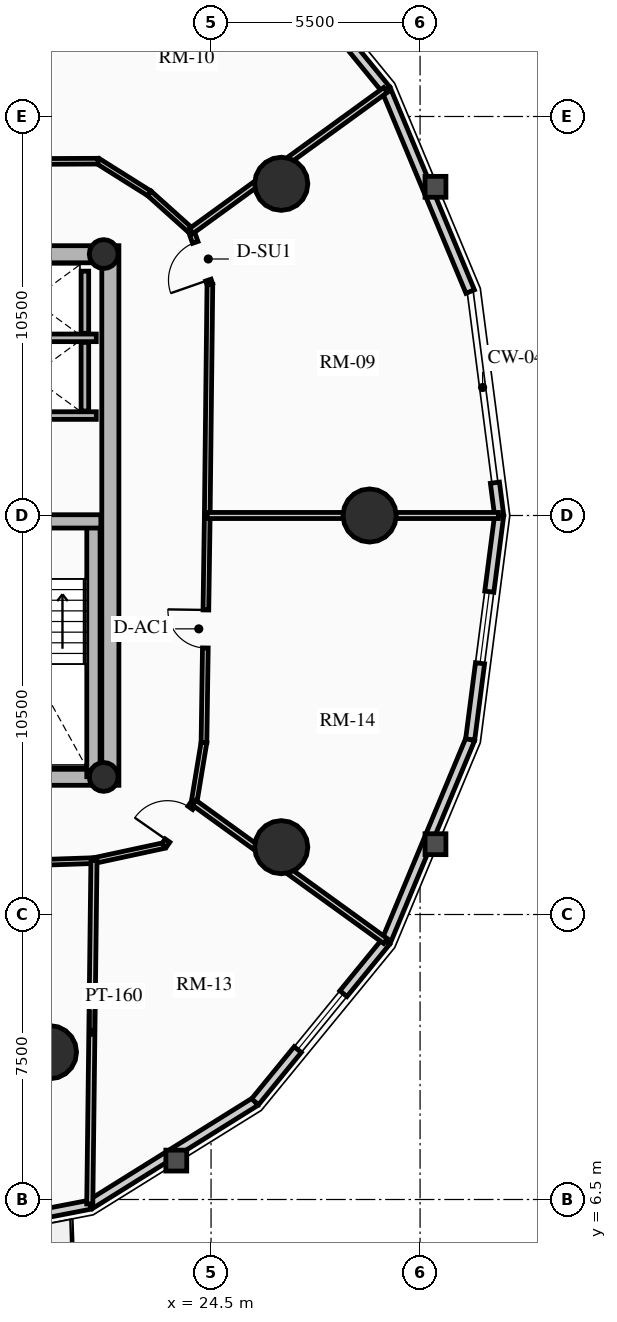
"""IFC4 building model, lengths in metres.
Left out: names, types, materials, properties, quantities, classifications, styles, units other than length and angle.
Written with IfcOpenShell. Run it as: python <this file> out.ifc"""

import sys

from ifc_helpers import new_model, si_unit, direction, frame, frame_2d, origin, origin_2d, place, context, subcontext, project, spatial, rectangle, circle, hollow_circle, extrude, source, transform, mapped, element, fill, save


model = new_model("IFC4")
c1 = context("Model", 3, precision=1e-05, world=origin(), true_north=direction((0.0, 1.0)))
c2 = subcontext(c1, "Body", "Model", "MODEL_VIEW")
j1 = project(units=[si_unit("LENGTHUNIT", "METRE"), si_unit("PLANEANGLEUNIT", "RADIAN")], contexts=[c1])
p1 = place(None, origin())
s1 = spatial("IfcSite", under=j1, at=p1, CompositionType="ELEMENT")
p2 = place(p1, origin())
s2 = spatial("IfcBuilding", under=s1, at=p2, CompositionType="ELEMENT")
p3 = place(p2, frame((0.0, 0.0, 122.53)))
s3 = spatial("IfcBuildingStorey", under=s2, at=p3, CompositionType="ELEMENT", Elevation=122.53)
p4 = place(p3, frame((21.85, 17.4, 0.0), z_axis=(0.0, 0.0, 1.0), x_axis=(0.0, 1.0, 0.0)))
e1 = element("IfcWall", 1, at=p4, inside=s3, PredefinedType="SHEAR", context=c2, shape_type="SweptSolid", body=[
    extrude(rectangle(XDim=14.2, YDim=0.45, at=frame_2d((7.1, 0.0))), origin(), (0.0, 0.0, 1.0), 2.91),
])
p5 = place(p3, frame((11.15, 17.625, 0.0), z_axis=(0.0, 0.0, 1.0), x_axis=(1.0, 0.0, 0.0)))
e2 = element("IfcWall", 2, at=p5, inside=s3, PredefinedType="SHEAR", context=c2, shape_type="SweptSolid", body=[
    extrude(rectangle(XDim=10.7, YDim=0.45, at=frame_2d((5.35, 0.0))), origin(), (0.0, 0.0, 1.0), 2.91),
])
m1 = source(origin(), c2, "Body", "SweptSolid", [
    extrude(rectangle(XDim=1.5, YDim=2.02, at=frame_2d((0.75, 1.01))), frame((0.0, 0.235, 0.0), z_axis=(0.0, -1.0, 0.0), x_axis=(1.0, 0.0, 0.0)), (0.0, 0.0, 1.0), 0.47),
])
p6 = place(p5, frame((5.45, 0.0, 0.0)))
e3 = element("IfcOpeningElement", 3, at=p6, cuts=e2, PredefinedType="OPENING", context=c2, shape_type="MappedRepresentation", body=[
    mapped(m1, transform((0.0, 0.0, 0.0), x_axis=(1.0, 0.0, 0.0), y_axis=(0.0, 1.0, 0.0), z_axis=(0.0, 0.0, 1.0), scale=1.0)),
])
p7 = place(p3, frame((11.15, 31.375, 0.0), z_axis=(0.0, 0.0, 1.0), x_axis=(1.0, 0.0, 0.0)))
e4 = element("IfcWall", 4, at=p7, inside=s3, PredefinedType="SHEAR", context=c2, shape_type="SweptSolid", body=[
    extrude(rectangle(XDim=10.7, YDim=0.45, at=frame_2d((5.35, 0.0))), origin(), (0.0, 0.0, 1.0), 2.91),
])
p8 = place(p7, frame((4.6, 0.0, 0.0)))
e5 = element("IfcOpeningElement", 5, at=p8, cuts=e4, PredefinedType="OPENING", context=c2, shape_type="MappedRepresentation", body=[
    mapped(m1, transform((0.0, 0.0, 0.0), x_axis=(1.0, 0.0, 0.0), y_axis=(0.0, 1.0, 0.0), z_axis=(0.0, 0.0, 1.0), scale=1.0)),
])
p9 = place(p3, frame((21.405, 17.625, 0.0), z_axis=(0.0, 0.0, 1.0), x_axis=(0.0, 1.0, 0.0)))
e6 = element("IfcWall", 6, at=p9, inside=s3, PredefinedType="SHEAR", context=c2, shape_type="SweptSolid", body=[
    extrude(rectangle(XDim=6.72, YDim=0.35, at=frame_2d((3.36, 0.0))), origin(), (0.0, 0.0, 1.0), 2.91),
])
p10 = place(p3, frame((18.315, 24.345, 0.0), z_axis=(0.0, 0.0, 1.0), x_axis=(1.0, 0.0, 0.0)))
e7 = element("IfcWall", 7, at=p10, inside=s3, PredefinedType="SHEAR", context=c2, shape_type="SweptSolid", body=[
    extrude(rectangle(XDim=3.285, YDim=0.35, at=frame_2d((1.643, 0.0))), origin(), (0.0, 0.0, 1.0), 2.91),
])
for number, where, z_axis, x_axis in (
    (8, (21.675, 17.62, 0.0), (0.0, 0.0, 1.0), (1.0, 0.0, 0.0)),
    (9, (21.675, 31.38, 0.0), (0.0, 0.0, 1.0), (1.0, 0.0, 0.0)),
):
    element("IfcColumn", number, at=place(p3, frame(where, z_axis=z_axis, x_axis=x_axis)), inside=s3, PredefinedType="COLUMN", context=c2, shape_type="SweptSolid", body=[
        extrude(hollow_circle(Radius=0.38, WallThickness=0.032, at=origin_2d()), origin(), (0.0, 0.0, 1.0), 2.91),
    ])
for number, where, z_axis, x_axis in (
    (10, (28.672, 24.5, 0.0), (0.0, 0.0, 1.0), (1.0, 0.0, 0.0)),
    (11, (26.347, 33.229, 0.0), (0.0, 0.0, 1.0), (1.0, 0.0, 0.0)),
    (12, (20.261, 10.377, 0.0), (0.0, 0.0, 1.0), (1.0, 0.0, 0.0)),
    (13, (26.347, 15.771, 0.0), (0.0, 0.0, 1.0), (1.0, 0.0, 0.0)),
):
    element("IfcColumn", number, at=place(p3, frame(where, z_axis=z_axis, x_axis=x_axis)), inside=s3, PredefinedType="USERDEFINED", context=c2, shape_type="SweptSolid", body=[
        extrude(circle(Radius=0.7, at=origin_2d()), origin(), (0.0, 0.0, 1.0), 2.91),
    ])
p11 = place(p3, frame((31.969, 25.363, 0.0), z_axis=(0.0, 0.0, 1.0), x_axis=(0.128523364007, -0.991706481225, 0.0)))
e14 = element("IfcWall", 14, at=p11, inside=s3, PredefinedType="SOLIDWALL", context=c2, shape_type="SweptSolid", body=[
    extrude(rectangle(XDim=0.87, YDim=0.24, at=frame_2d((0.435, 0.0))), origin(), (0.0, 0.0, 1.0), 2.615),
])
p12 = place(p3, frame((29.105, 35.709, 0.0), z_axis=(0.0, 0.0, 1.0), x_axis=(0.384344417632, -0.923189779317, 0.0)))
e15 = element("IfcWall", 15, at=p12, inside=s3, PredefinedType="SOLIDWALL", context=c2, shape_type="SweptSolid", body=[
    extrude(rectangle(XDim=5.758, YDim=0.24, at=frame_2d((2.879, 0.0))), origin(), (0.0, 0.0, 1.0), 2.139),
])
p13 = place(p3, frame((25.658, 39.928, 0.0), z_axis=(0.0, 0.0, 1.0), x_axis=(0.632700781152, -0.77439635945, 0.0)))
e16 = element("IfcWall", 16, at=p13, inside=s3, PredefinedType="SOLIDWALL", context=c2, shape_type="SweptSolid", body=[
    extrude(rectangle(XDim=5.448, YDim=0.24, at=frame_2d((2.724, 0.0))), origin(), (0.0, 0.0, 1.0), 2.139),
])
m2 = source(origin(), c2, "Body", "SweptSolid", [
    extrude(rectangle(XDim=1.9, YDim=1.35, at=frame_2d((0.95, 0.675))), frame((0.0, 0.13, 0.0), z_axis=(0.0, -1.0, 0.0), x_axis=(1.0, 0.0, 0.0)), (0.0, 0.0, 1.0), 0.26),
])
p14 = place(p13, frame((1.774, 0.0, 0.65)))
e17 = element("IfcOpeningElement", 17, at=p14, cuts=e16, PredefinedType="OPENING", context=c2, shape_type="MappedRepresentation", body=[
    mapped(m2, transform((0.0, 0.0, 0.0), x_axis=(1.0, 0.0, 0.0), y_axis=(0.0, 1.0, 0.0), z_axis=(0.0, 0.0, 1.0), scale=1.0)),
])
p15 = place(p3, frame((21.315, 6.363, 0.0), z_axis=(0.0, 0.0, 1.0), x_axis=(-0.981723785992, -0.190311344954, 0.0)))
e18 = element("IfcWall", 18, at=p15, inside=s3, PredefinedType="SOLIDWALL", context=c2, shape_type="SweptSolid", body=[
    extrude(rectangle(XDim=4.904, YDim=0.24, at=frame_2d((2.452, 0.0))), origin(), (0.0, 0.0, 1.0), 2.139),
])
m3 = source(origin(), c2, "Body", "SweptSolid", [
    extrude(rectangle(XDim=1.15, YDim=2.005, at=frame_2d((0.575, 1.002))), frame((0.0, 0.13, 0.0), z_axis=(0.0, -1.0, 0.0), x_axis=(1.0, 0.0, 0.0)), (0.0, 0.0, 1.0), 0.26),
])
p16 = place(p15, frame((1.877, 0.0, 0.0)))
e19 = element("IfcOpeningElement", 19, at=p16, cuts=e18, PredefinedType="OPENING", context=c2, shape_type="MappedRepresentation", body=[
    mapped(m3, transform((0.0, 0.0, 0.0), x_axis=(1.0, 0.0, 0.0), y_axis=(0.0, 1.0, 0.0), z_axis=(0.0, 0.0, 1.0), scale=1.0)),
])
p17 = place(p3, frame((25.658, 9.072, 0.0), z_axis=(0.0, 0.0, 1.0), x_axis=(-0.848520380187, -0.529162701263, 0.0)))
e20 = element("IfcWall", 20, at=p17, inside=s3, PredefinedType="SOLIDWALL", context=c2, shape_type="SweptSolid", body=[
    extrude(rectangle(XDim=5.119, YDim=0.24, at=frame_2d((2.56, 0.0))), origin(), (0.0, 0.0, 1.0), 2.139),
])
p18 = place(p3, frame((29.105, 13.291, 0.0), z_axis=(0.0, 0.0, 1.0), x_axis=(-0.632700781152, -0.77439635945, 0.0)))
e21 = element("IfcWall", 21, at=p18, inside=s3, PredefinedType="SOLIDWALL", context=c2, shape_type="SweptSolid", body=[
    extrude(rectangle(XDim=5.448, YDim=0.24, at=frame_2d((2.724, 0.0))), origin(), (0.0, 0.0, 1.0), 2.139),
])
p19 = place(p18, frame((1.774, 0.0, 0.65)))
e22 = element("IfcOpeningElement", 22, at=p19, cuts=e21, PredefinedType="OPENING", context=c2, shape_type="MappedRepresentation", body=[
    mapped(m2, transform((0.0, 0.0, 0.0), x_axis=(1.0, 0.0, 0.0), y_axis=(0.0, 1.0, 0.0), z_axis=(0.0, 0.0, 1.0), scale=1.0)),
])
p20 = place(p3, frame((31.318, 18.607, 0.0), z_axis=(0.0, 0.0, 1.0), x_axis=(-0.384344417632, -0.923189779317, 0.0)))
e23 = element("IfcWall", 23, at=p20, inside=s3, PredefinedType="SOLIDWALL", context=c2, shape_type="SweptSolid", body=[
    extrude(rectangle(XDim=5.758, YDim=0.24, at=frame_2d((2.879, 0.0))), origin(), (0.0, 0.0, 1.0), 2.139),
])
p21 = place(p3, frame((32.081, 24.5, 0.0), z_axis=(0.0, 0.0, 1.0), x_axis=(-0.128351991996, -0.991728675672, 0.0)))
e24 = element("IfcWall", 24, at=p21, inside=s3, PredefinedType="SOLIDWALL", context=c2, shape_type="SweptSolid", body=[
    extrude(rectangle(XDim=5.942, YDim=0.24, at=frame_2d((2.971, 0.0))), origin(), (0.0, 0.0, 1.0), 2.139),
])
p22 = place(p21, frame((2.021, 0.0, 0.65)))
e25 = element("IfcOpeningElement", 25, at=p22, cuts=e24, PredefinedType="OPENING", context=c2, shape_type="MappedRepresentation", body=[
    mapped(m2, transform((0.0, 0.0, 0.0), x_axis=(1.0, 0.0, 0.0), y_axis=(0.0, 1.0, 0.0), z_axis=(0.0, 0.0, 1.0), scale=1.0)),
])
for number, where, z_axis, x_axis in (
    (26, (18.51, 27.13, 0.0), (0.0, 0.0, 1.0), (1.0, 0.0, 0.0)),
    (27, (18.51, 29.175, 0.0), (0.0, 0.0, 1.0), (1.0, 0.0, 0.0)),
):
    element("IfcWall", number, at=place(p3, frame(where, z_axis=z_axis, x_axis=x_axis)), inside=s3, PredefinedType="SHEAR", context=c2, shape_type="SweptSolid", body=[
        extrude(rectangle(XDim=2.97, YDim=0.2, at=frame_2d((1.485, 0.0))), origin(), (0.0, 0.0, 1.0), 2.91),
    ])
p23 = place(p3, frame((21.18, 27.25, 0.0), z_axis=(0.0, 0.0, 1.0), x_axis=(0.0, 1.0, 0.0)))
e28 = element("IfcWall", 28, at=p23, inside=s3, PredefinedType="SHEAR", context=c2, shape_type="SweptSolid", body=[
    extrude(rectangle(XDim=1.805, YDim=0.2, at=frame_2d((0.902, 0.0))), origin(), (0.0, 0.0, 1.0), 2.91),
])
p24 = place(p3, frame((21.18, 29.295, 0.0), z_axis=(0.0, 0.0, 1.0), x_axis=(0.0, 1.0, 0.0)))
e29 = element("IfcWall", 29, at=p24, inside=s3, PredefinedType="SHEAR", context=c2, shape_type="SweptSolid", body=[
    extrude(rectangle(XDim=1.635, YDim=0.2, at=frame_2d((0.817, 0.0))), origin(), (0.0, 0.0, 1.0), 2.91),
])
p25 = place(p3, frame((24.4, 24.5, 0.0), z_axis=(0.0, 0.0, 1.0), x_axis=(0.011359710161, 0.999935476411, 0.0)))
e30 = element("IfcWall", 30, at=p25, inside=s3, PredefinedType="PARTITIONING", context=c2, shape_type="SweptSolid", body=[
    extrude(rectangle(XDim=6.082, YDim=0.15, at=frame_2d((3.041, 0.0))), origin(), (0.0, 0.0, 1.0), 2.185),
])
p26 = place(p3, frame((24.469, 30.582, 0.0), z_axis=(0.0, 0.0, 1.0), x_axis=(-0.328902536986, 0.944363871166, 0.0)))
e31 = element("IfcWall", 31, at=p26, inside=s3, PredefinedType="PARTITIONING", context=c2, shape_type="SweptSolid", body=[
    extrude(rectangle(XDim=1.488, YDim=0.15, at=frame_2d((0.744, 0.0))), origin(), (0.0, 0.0, 1.0), 2.185),
])
m4 = source(origin(), c2, "Body", "SweptSolid", [
    extrude(rectangle(XDim=1.05, YDim=2.015, at=frame_2d((0.525, 1.007))), frame((0.0, 0.085, 0.0), z_axis=(0.0, -1.0, 0.0), x_axis=(1.0, 0.0, 0.0)), (0.0, 0.0, 1.0), 0.17),
])
p27 = place(p26, frame((0.12, 0.0, 0.0)))
e32 = element("IfcOpeningElement", 32, at=p27, cuts=e31, PredefinedType="OPENING", context=c2, shape_type="MappedRepresentation", body=[
    mapped(m4, transform((0.0, 0.0, 0.0), x_axis=(1.0, 0.0, 0.0), y_axis=(0.0, 1.0, 0.0), z_axis=(0.0, 0.0, 1.0), scale=1.0)),
])
p28 = place(p3, frame((23.98, 31.987, 0.0), z_axis=(0.0, 0.0, 1.0), x_axis=(-0.744317922268, 0.667825449193, 0.0)))
e33 = element("IfcWall", 33, at=p28, inside=s3, PredefinedType="PARTITIONING", context=c2, shape_type="SweptSolid", body=[
    extrude(rectangle(XDim=1.481, YDim=0.15, at=frame_2d((0.74, 0.0))), origin(), (0.0, 0.0, 1.0), 2.185),
])
p29 = place(p3, frame((22.877, 32.976, 0.0), z_axis=(0.0, 0.0, 1.0), x_axis=(-0.846723232687, 0.532033614754, 0.0)))
e34 = element("IfcWall", 34, at=p29, inside=s3, PredefinedType="PARTITIONING", context=c2, shape_type="SweptSolid", body=[
    extrude(rectangle(XDim=1.595, YDim=0.15, at=frame_2d((0.797, 0.0))), origin(), (0.0, 0.0, 1.0), 2.185),
])
p30 = place(p3, frame((21.527, 33.824, 0.0), z_axis=(0.0, 0.0, 1.0), x_axis=(-0.999990631344, -0.00432865146, 0.0)))
e35 = element("IfcWall", 35, at=p30, inside=s3, PredefinedType="PARTITIONING", context=c2, shape_type="SweptSolid", body=[
    extrude(rectangle(XDim=3.384, YDim=0.15, at=frame_2d((1.692, 0.0))), origin(), (0.0, 0.0, 1.0), 2.185),
])
p31 = place(p3, frame((14.781, 15.191, 0.0), z_axis=(0.0, 0.0, 1.0), x_axis=(0.999412963972, 0.034259705842, 0.0)))
e36 = element("IfcWall", 36, at=p31, inside=s3, PredefinedType="PARTITIONING", context=c2, shape_type="SweptSolid", body=[
    extrude(rectangle(XDim=6.642, YDim=0.15, at=frame_2d((3.321, 0.0))), origin(), (0.0, 0.0, 1.0), 2.185),
])
p32 = place(p3, frame((21.419, 15.418, 0.0), z_axis=(0.0, 0.0, 1.0), x_axis=(0.977540384091, 0.210748184977, 0.0)))
e37 = element("IfcWall", 37, at=p32, inside=s3, PredefinedType="PARTITIONING", context=c2, shape_type="SweptSolid", body=[
    extrude(rectangle(XDim=1.887, YDim=0.15, at=frame_2d((0.944, 0.0))), origin(), (0.0, 0.0, 1.0), 2.185),
])
p33 = place(p3, frame((23.263, 15.816, 0.0), z_axis=(0.0, 0.0, 1.0), x_axis=(0.572652947117, 0.819797903241, 0.0)))
e38 = element("IfcWall", 38, at=p33, inside=s3, PredefinedType="PARTITIONING", context=c2, shape_type="SweptSolid", body=[
    extrude(rectangle(XDim=1.377, YDim=0.15, at=frame_2d((0.688, 0.0))), origin(), (0.0, 0.0, 1.0), 2.185),
])
p34 = place(p33, frame((0.158, 0.0, 0.0)))
e39 = element("IfcOpeningElement", 39, at=p34, cuts=e38, PredefinedType="OPENING", context=c2, shape_type="MappedRepresentation", body=[
    mapped(m4, transform((0.0, 0.0, 0.0), x_axis=(1.0, 0.0, 0.0), y_axis=(0.0, 1.0, 0.0), z_axis=(0.0, 0.0, 1.0), scale=1.0)),
])
p35 = place(p3, frame((24.052, 16.945, 0.0), z_axis=(0.0, 0.0, 1.0), x_axis=(0.162869842843, 0.986647563364, 0.0)))
e40 = element("IfcWall", 40, at=p35, inside=s3, PredefinedType="PARTITIONING", context=c2, shape_type="SweptSolid", body=[
    extrude(rectangle(XDim=1.605, YDim=0.15, at=frame_2d((0.803, 0.0))), origin(), (0.0, 0.0, 1.0), 2.185),
])
p36 = place(p3, frame((24.313, 18.529, 0.0), z_axis=(0.0, 0.0, 1.0), x_axis=(0.014472275982, 0.99989527113, 0.0)))
e41 = element("IfcWall", 41, at=p36, inside=s3, PredefinedType="PARTITIONING", context=c2, shape_type="SweptSolid", body=[
    extrude(rectangle(XDim=5.972, YDim=0.15, at=frame_2d((2.986, 0.0))), origin(), (0.0, 0.0, 1.0), 2.615),
])
m5 = source(origin(), c2, "Body", "SweptSolid", [
    extrude(rectangle(XDim=1.0, YDim=2.015, at=frame_2d((0.5, 1.007))), frame((0.0, 0.085, 0.0), z_axis=(0.0, -1.0, 0.0), x_axis=(1.0, 0.0, 0.0)), (0.0, 0.0, 1.0), 0.17),
])
p37 = place(p36, frame((2.486, 0.0, 0.0)))
e42 = element("IfcOpeningElement", 42, at=p37, cuts=e41, PredefinedType="OPENING", context=c2, shape_type="MappedRepresentation", body=[
    mapped(m5, transform((0.0, 0.0, 0.0), x_axis=(1.0, 0.0, 0.0), y_axis=(0.0, 1.0, 0.0), z_axis=(0.0, 0.0, 1.0), scale=1.0)),
])
p38 = place(p3, frame((24.4, 24.5, 0.0), z_axis=(0.0, 0.0, 1.0), x_axis=(1.0, 0.0, 0.0)))
e43 = element("IfcWall", 43, at=p38, inside=s3, PredefinedType="PARTITIONING", context=c2, shape_type="SweptSolid", body=[
    extrude(rectangle(XDim=7.661, YDim=0.16, at=frame_2d((3.831, 0.0))), origin(), (0.0, 0.0, 1.0), 2.139),
])
p39 = place(p3, frame((23.98, 31.987, 0.0), z_axis=(0.0, 0.0, 1.0), x_axis=(0.809128798462, 0.587631336383, 0.0)))
e44 = element("IfcWall", 44, at=p39, inside=s3, PredefinedType="PARTITIONING", context=c2, shape_type="SweptSolid", body=[
    extrude(rectangle(XDim=6.315, YDim=0.16, at=frame_2d((3.157, 0.0))), origin(), (0.0, 0.0, 1.0), 2.139),
])
p40 = place(p3, frame((21.419, 15.418, 0.0), z_axis=(0.0, 0.0, 1.0), x_axis=(-0.012184661849, -0.999925764252, 0.0)))
e45 = element("IfcWall", 45, at=p40, inside=s3, PredefinedType="PARTITIONING", context=c2, shape_type="SweptSolid", body=[
    extrude(rectangle(XDim=9.037, YDim=0.16, at=frame_2d((4.518, 0.0))), origin(), (0.0, 0.0, 1.0), 2.139),
])
p41 = place(p3, frame((24.052, 16.945, 0.0), z_axis=(0.0, 0.0, 1.0), x_axis=(0.810360113077, -0.58593215233, 0.0)))
e46 = element("IfcWall", 46, at=p41, inside=s3, PredefinedType="PARTITIONING", context=c2, shape_type="SweptSolid", body=[
    extrude(rectangle(XDim=6.216, YDim=0.16, at=frame_2d((3.108, 0.0))), origin(), (0.0, 0.0, 1.0), 2.139),
])
m6 = source(origin(), c2, "Body", "SweptSolid", [
    extrude(rectangle(XDim=1.9, YDim=1.35, at=frame_2d((0.95, 0.675))), frame((0.0, 0.03, 0.0), z_axis=(0.0, -1.0, 0.0), x_axis=(1.0, 0.0, 0.0)), (0.0, 0.0, 1.0), 0.06),
])
p42 = place(p19, origin())
e47 = element("IfcWindow", 47, at=p42, inside=s3, PartitioningType="DOUBLE_PANEL_VERTICAL", PredefinedType="WINDOW", context=c2, shape_type="MappedRepresentation", body=[
    mapped(m6, transform((0.0, 0.0, 0.0), x_axis=(1.0, 0.0, 0.0), y_axis=(0.0, 1.0, 0.0), z_axis=(0.0, 0.0, 1.0), scale=1.0)),
])
fill(e22, e47)
p43 = place(p22, origin())
e48 = element("IfcWindow", 48, at=p43, inside=s3, PartitioningType="DOUBLE_PANEL_VERTICAL", PredefinedType="WINDOW", context=c2, shape_type="MappedRepresentation", body=[
    mapped(m6, transform((0.0, 0.0, 0.0), x_axis=(1.0, 0.0, 0.0), y_axis=(0.0, 1.0, 0.0), z_axis=(0.0, 0.0, 1.0), scale=1.0)),
])
fill(e25, e48)
m7 = source(origin(), c2, "Body", "SweptSolid", [
    extrude(rectangle(XDim=1.05, YDim=2.015, at=frame_2d((0.525, 1.007))), frame((0.0, 0.025, 0.0), z_axis=(0.0, -1.0, 0.0), x_axis=(1.0, 0.0, 0.0)), (0.0, 0.0, 1.0), 0.05),
])
p44 = place(p27, origin())
e49 = element("IfcDoor", 49, at=p44, inside=s3, OperationType="SINGLE_SWING_LEFT", PredefinedType="DOOR", context=c2, shape_type="MappedRepresentation", body=[
    mapped(m7, transform((0.0, 0.0, 0.0), x_axis=(1.0, 0.0, 0.0), y_axis=(0.0, 1.0, 0.0), z_axis=(0.0, 0.0, 1.0), scale=1.0)),
])
fill(e32, e49)
p45 = place(p34, origin())
e50 = element("IfcDoor", 50, at=p45, inside=s3, OperationType="SINGLE_SWING_LEFT", PredefinedType="DOOR", context=c2, shape_type="MappedRepresentation", body=[
    mapped(m7, transform((0.0, 0.0, 0.0), x_axis=(1.0, 0.0, 0.0), y_axis=(0.0, 1.0, 0.0), z_axis=(0.0, 0.0, 1.0), scale=1.0)),
])
fill(e39, e50)
m8 = source(origin(), c2, "Body", "SweptSolid", [
    extrude(rectangle(XDim=1.0, YDim=2.015, at=frame_2d((0.5, 1.007))), frame((0.0, 0.025, 0.0), z_axis=(0.0, -1.0, 0.0), x_axis=(1.0, 0.0, 0.0)), (0.0, 0.0, 1.0), 0.05),
])
p46 = place(p37, origin())
e51 = element("IfcDoor", 51, at=p46, inside=s3, OperationType="SINGLE_SWING_RIGHT", PredefinedType="DOOR", context=c2, shape_type="MappedRepresentation", body=[
    mapped(m8, transform((0.0, 0.0, 0.0), x_axis=(1.0, 0.0, 0.0), y_axis=(0.0, 1.0, 0.0), z_axis=(0.0, 0.0, 1.0), scale=1.0)),
])
fill(e42, e51)
save(model, sys.argv[1])
